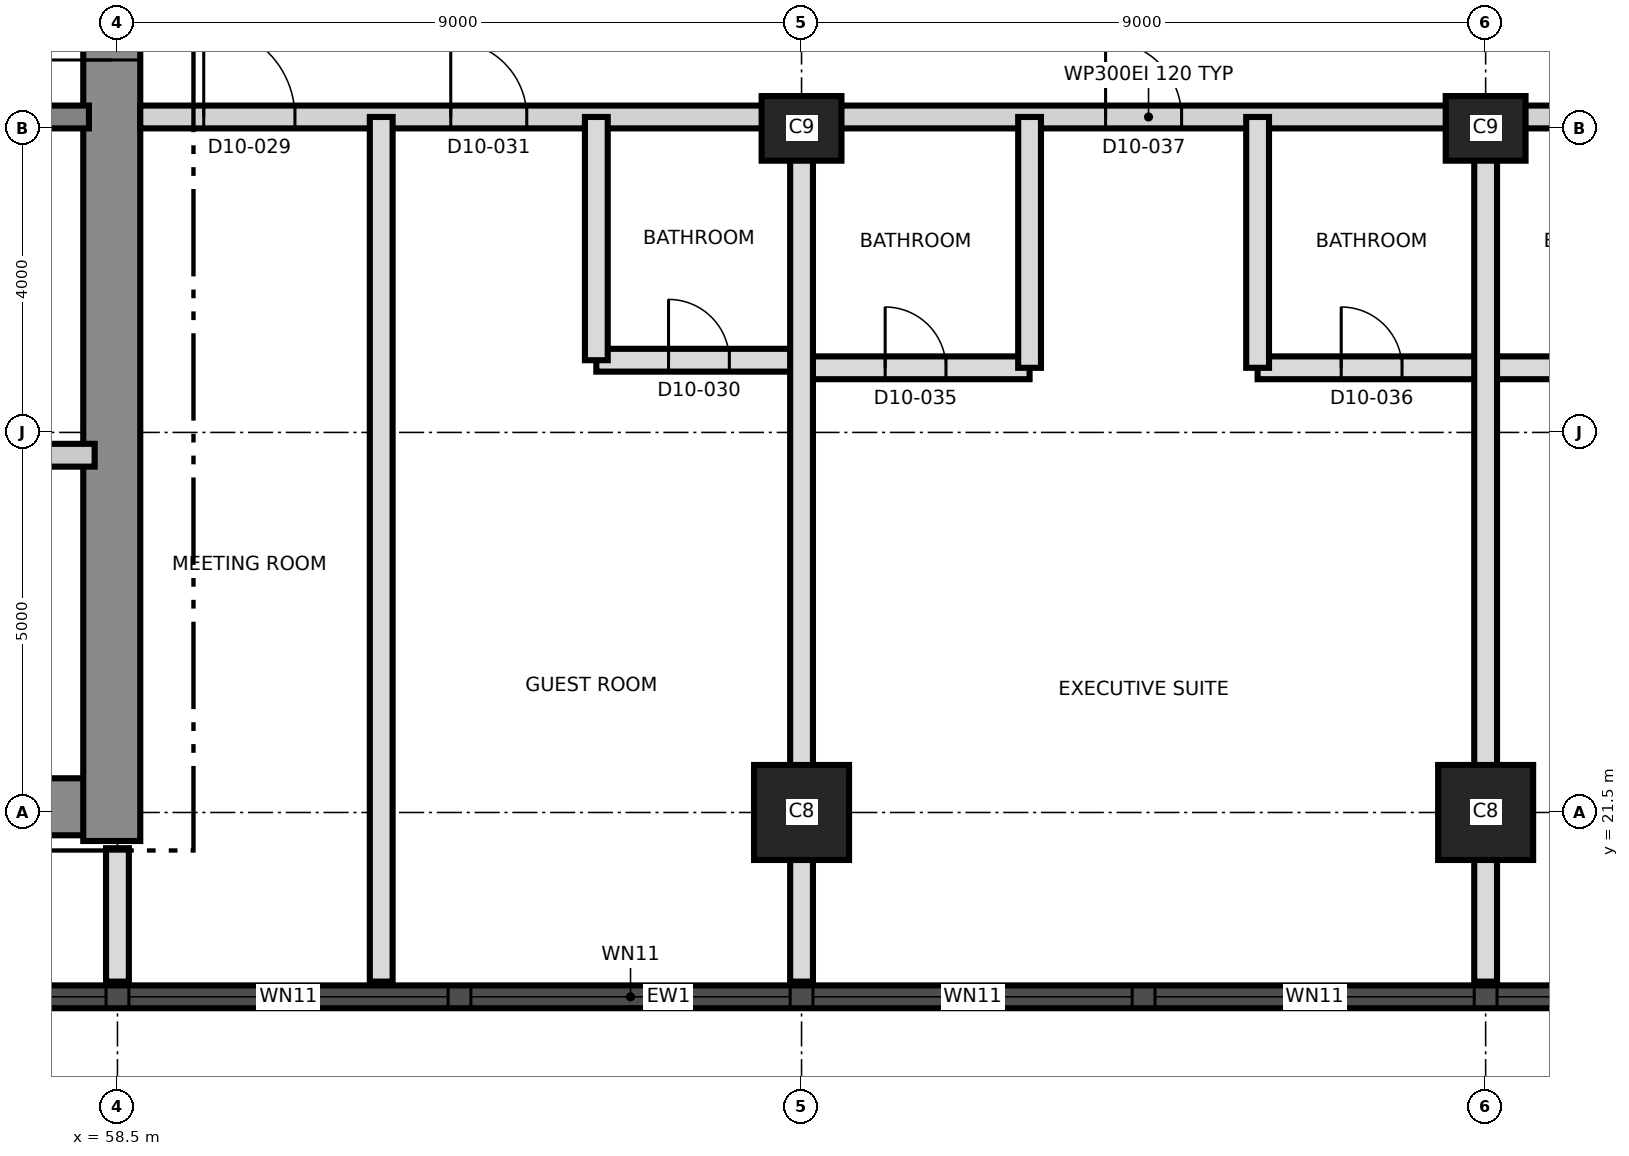
"""IFC4 building model, lengths in metres.
Left out: names, types, materials, properties, quantities, classifications, styles, units other than length and angle.
Written with IfcOpenShell. Run it as: python <this file> out.ifc"""

import sys

from ifc_helpers import new_model, si_unit, direction, frame, frame_2d, origin, origin_2d, place, context, subcontext, project, spatial, rectangle, extrude, element, fill, save


model = new_model("IFC4")
c1 = context("Model", 3, precision=1e-05, world=origin(), true_north=direction((0.0, 1.0)))
c2 = subcontext(c1, "Body", "Model", "MODEL_VIEW")
j1 = project(units=[si_unit("LENGTHUNIT", "METRE"), si_unit("PLANEANGLEUNIT", "RADIAN")], contexts=[c1])
p1 = place(None, origin())
s1 = spatial("IfcSite", under=j1, at=p1, CompositionType="ELEMENT")
p2 = place(p1, origin())
s2 = spatial("IfcBuilding", under=s1, at=p2, CompositionType="ELEMENT")
p3 = place(p2, frame((0.0, 0.0, 116.7)))
s3 = spatial("IfcBuildingStorey", under=s2, at=p3, CompositionType="ELEMENT", Elevation=116.7)
p4 = place(p3, frame((31.125, 21.575, 0.0), z_axis=(0.0, 0.0, 1.0), x_axis=(1.0, 0.0, 0.0)))
e1 = element("IfcWall", 1, at=p4, inside=s3, PredefinedType="SHEAR", context=c2, shape_type="SweptSolid", body=[
    extrude(rectangle(XDim=27.0, YDim=0.75, at=frame_2d((13.5, 0.0))), origin(), (0.0, 0.0, 1.0), 3.7),
])
p5 = place(p3, frame((58.425, 21.125, 0.0), z_axis=(0.0, 0.0, 1.0), x_axis=(0.0, 1.0, 0.0)))
e2 = element("IfcWall", 2, at=p5, inside=s3, PredefinedType="SHEAR", context=c2, shape_type="SweptSolid", body=[
    extrude(rectangle(XDim=18.75, YDim=0.75, at=frame_2d((9.375, 0.0))), origin(), (0.0, 0.0, 1.0), 3.7),
])
p6 = place(p5, frame((10.275, 0.0, 0.0)))
e3 = element("IfcOpeningElement", 3, at=p6, cuts=e2, PredefinedType="OPENING", context=c2, shape_type="SweptSolid", body=[
    extrude(rectangle(XDim=1.2, YDim=2.1, at=frame_2d((0.6, 1.05))), frame((0.0, 0.385, 0.0), z_axis=(0.0, -1.0, 0.0), x_axis=(1.0, 0.0, 0.0)), (0.0, 0.0, 1.0), 0.77),
])
p7 = place(p3, frame((31.875, 30.65, 0.0), z_axis=(0.0, 0.0, 1.0), x_axis=(1.0, 0.0, 0.0)))
e4 = element("IfcWall", 4, at=p7, inside=s3, PredefinedType="SHEAR", context=c2, shape_type="SweptSolid", body=[
    extrude(rectangle(XDim=26.25, YDim=0.3, at=frame_2d((13.125, 0.0))), origin(), (0.0, 0.0, 1.0), 3.7),
])
p8 = place(p7, frame((24.625, 0.0, 0.0)))
e5 = element("IfcOpeningElement", 5, at=p8, cuts=e4, PredefinedType="OPENING", context=c2, shape_type="SweptSolid", body=[
    extrude(rectangle(XDim=1.0, YDim=2.1, at=frame_2d((0.5, 1.05))), frame((0.0, 0.16, 0.0), z_axis=(0.0, -1.0, 0.0), x_axis=(1.0, 0.0, 0.0)), (0.0, 0.0, 1.0), 0.32),
])
p9 = place(p7, frame((11.425, 0.0, 0.0)))
e6 = element("IfcOpeningElement", 6, at=p9, cuts=e4, PredefinedType="OPENING", context=c2, shape_type="SweptSolid", body=[
    extrude(rectangle(XDim=1.0, YDim=2.1, at=frame_2d((0.5, 1.05))), frame((0.0, 0.16, 0.0), z_axis=(0.0, -1.0, 0.0), x_axis=(1.0, 0.0, 0.0)), (0.0, 0.0, 1.0), 0.32),
])
for number, where, z_axis, x_axis in (
    (7, (67.5, 21.5, 0.0), (0.0, 0.0, 1.0), (1.0, 0.0, 0.0)),
    (8, (76.5, 21.5, 0.0), (0.0, 0.0, 1.0), (1.0, 0.0, 0.0)),
):
    element("IfcColumn", number, at=place(p3, frame(where, z_axis=z_axis, x_axis=x_axis)), inside=s3, PredefinedType="COLUMN", context=c2, shape_type="SweptSolid", body=[
        extrude(rectangle(XDim=1.25, YDim=1.25, at=origin_2d()), origin(), (0.0, 0.0, 1.0), 3.7),
    ])
for number, where, z_axis, x_axis in (
    (9, (67.5, 30.5, 0.0), (0.0, 0.0, 1.0), (1.0, 0.0, 0.0)),
    (10, (76.5, 30.5, 0.0), (0.0, 0.0, 1.0), (1.0, 0.0, 0.0)),
):
    element("IfcColumn", number, at=place(p3, frame(where, z_axis=z_axis, x_axis=x_axis)), inside=s3, PredefinedType="COLUMN", context=c2, shape_type="SweptSolid", body=[
        extrude(rectangle(XDim=1.05, YDim=0.85, at=origin_2d()), origin(), (0.0, 0.0, 1.0), 3.7),
    ])
p10 = place(p3, frame((44.01, 19.075, 0.0), z_axis=(0.0, 0.0, 1.0), x_axis=(1.0, 0.0, 0.0)))
e11 = element("IfcWall", 11, at=p10, inside=s3, PredefinedType="SOLIDWALL", context=c2, shape_type="SweptSolid", body=[
    extrude(rectangle(XDim=43.478, YDim=0.3, at=frame_2d((21.739, 0.0))), origin(), (0.0, 0.0, 1.0), 3.4),
])
p11 = place(p10, frame((1.845, 0.0, 0.3)))
e12 = element("IfcOpeningElement", 12, at=p11, cuts=e11, PredefinedType="OPENING", context=c2, shape_type="SweptSolid", body=[
    extrude(rectangle(XDim=1.8, YDim=2.4, at=frame_2d((0.9, 1.2))), frame((0.0, 0.16, 0.0), z_axis=(0.0, -1.0, 0.0), x_axis=(1.0, 0.0, 0.0)), (0.0, 0.0, 1.0), 0.32),
])
p12 = place(p10, frame((5.64, 0.0, 0.9)))
e13 = element("IfcOpeningElement", 13, at=p12, cuts=e11, PredefinedType="OPENING", context=c2, shape_type="SweptSolid", body=[
    extrude(rectangle(XDim=4.2, YDim=1.5, at=frame_2d((2.1, 0.75))), frame((0.0, 0.16, 0.0), z_axis=(0.0, -1.0, 0.0), x_axis=(1.0, 0.0, 0.0)), (0.0, 0.0, 1.0), 0.32),
])
p13 = place(p10, frame((10.14, 0.0, 0.9)))
e14 = element("IfcOpeningElement", 14, at=p13, cuts=e11, PredefinedType="OPENING", context=c2, shape_type="SweptSolid", body=[
    extrude(rectangle(XDim=4.2, YDim=1.5, at=frame_2d((2.1, 0.75))), frame((0.0, 0.16, 0.0), z_axis=(0.0, -1.0, 0.0), x_axis=(1.0, 0.0, 0.0)), (0.0, 0.0, 1.0), 0.32),
])
p14 = place(p10, frame((14.64, 0.0, 0.9)))
e15 = element("IfcOpeningElement", 15, at=p14, cuts=e11, PredefinedType="OPENING", context=c2, shape_type="SweptSolid", body=[
    extrude(rectangle(XDim=4.2, YDim=1.5, at=frame_2d((2.1, 0.75))), frame((0.0, 0.16, 0.0), z_axis=(0.0, -1.0, 0.0), x_axis=(1.0, 0.0, 0.0)), (0.0, 0.0, 1.0), 0.32),
])
p15 = place(p10, frame((19.14, 0.0, 0.9)))
e16 = element("IfcOpeningElement", 16, at=p15, cuts=e11, PredefinedType="OPENING", context=c2, shape_type="SweptSolid", body=[
    extrude(rectangle(XDim=4.2, YDim=1.5, at=frame_2d((2.1, 0.75))), frame((0.0, 0.16, 0.0), z_axis=(0.0, -1.0, 0.0), x_axis=(1.0, 0.0, 0.0)), (0.0, 0.0, 1.0), 0.32),
])
p16 = place(p10, frame((23.64, 0.0, 0.9)))
e17 = element("IfcOpeningElement", 17, at=p16, cuts=e11, PredefinedType="OPENING", context=c2, shape_type="SweptSolid", body=[
    extrude(rectangle(XDim=4.2, YDim=1.5, at=frame_2d((2.1, 0.75))), frame((0.0, 0.16, 0.0), z_axis=(0.0, -1.0, 0.0), x_axis=(1.0, 0.0, 0.0)), (0.0, 0.0, 1.0), 0.32),
])
p17 = place(p10, frame((28.14, 0.0, 0.9)))
e18 = element("IfcOpeningElement", 18, at=p17, cuts=e11, PredefinedType="OPENING", context=c2, shape_type="SweptSolid", body=[
    extrude(rectangle(XDim=4.2, YDim=1.5, at=frame_2d((2.1, 0.75))), frame((0.0, 0.16, 0.0), z_axis=(0.0, -1.0, 0.0), x_axis=(1.0, 0.0, 0.0)), (0.0, 0.0, 1.0), 0.32),
])
p18 = place(p10, frame((32.64, 0.0, 0.9)))
e19 = element("IfcOpeningElement", 19, at=p18, cuts=e11, PredefinedType="OPENING", context=c2, shape_type="SweptSolid", body=[
    extrude(rectangle(XDim=4.2, YDim=1.5, at=frame_2d((2.1, 0.75))), frame((0.0, 0.16, 0.0), z_axis=(0.0, -1.0, 0.0), x_axis=(1.0, 0.0, 0.0)), (0.0, 0.0, 1.0), 0.32),
])
p19 = place(p10, frame((37.14, 0.0, 0.9)))
e20 = element("IfcOpeningElement", 20, at=p19, cuts=e11, PredefinedType="OPENING", context=c2, shape_type="SweptSolid", body=[
    extrude(rectangle(XDim=4.2, YDim=1.5, at=frame_2d((2.1, 0.75))), frame((0.0, 0.16, 0.0), z_axis=(0.0, -1.0, 0.0), x_axis=(1.0, 0.0, 0.0)), (0.0, 0.0, 1.0), 0.32),
])
p20 = place(p3, frame((55.8, 26.2, 0.0), z_axis=(0.0, 0.0, 1.0), x_axis=(1.0, 0.0, 0.0)))
e21 = element("IfcWall", 21, at=p20, inside=s3, PredefinedType="PARTITIONING", context=c2, shape_type="SweptSolid", body=[
    extrude(rectangle(XDim=2.4, YDim=0.3, at=frame_2d((1.2, 0.0))), origin(), (0.0, 0.0, 1.0), 3.4),
])
p21 = place(p20, frame((0.75, 0.0, 0.0)))
e22 = element("IfcOpeningElement", 22, at=p21, cuts=e21, PredefinedType="OPENING", context=c2, shape_type="SweptSolid", body=[
    extrude(rectangle(XDim=0.9, YDim=2.1, at=frame_2d((0.45, 1.05))), frame((0.0, 0.16, 0.0), z_axis=(0.0, -1.0, 0.0), x_axis=(1.0, 0.0, 0.0)), (0.0, 0.0, 1.0), 0.32),
])
p22 = place(p3, frame((67.5, 27.35, 0.0), z_axis=(0.0, 0.0, 1.0), x_axis=(1.0, 0.0, 0.0)))
e23 = element("IfcWall", 23, at=p22, inside=s3, PredefinedType="PARTITIONING", context=c2, shape_type="SweptSolid", body=[
    extrude(rectangle(XDim=3.0, YDim=0.3, at=frame_2d((1.5, 0.0))), origin(), (0.0, 0.0, 1.0), 3.4),
])
p23 = place(p22, frame((1.1, 0.0, 0.0)))
e24 = element("IfcOpeningElement", 24, at=p23, cuts=e23, PredefinedType="OPENING", context=c2, shape_type="SweptSolid", body=[
    extrude(rectangle(XDim=0.8, YDim=2.1, at=frame_2d((0.4, 1.05))), frame((0.0, 0.16, 0.0), z_axis=(0.0, -1.0, 0.0), x_axis=(1.0, 0.0, 0.0)), (0.0, 0.0, 1.0), 0.32),
])
p24 = place(p3, frame((73.5, 27.35, 0.0), z_axis=(0.0, 0.0, 1.0), x_axis=(1.0, 0.0, 0.0)))
e25 = element("IfcWall", 25, at=p24, inside=s3, PredefinedType="PARTITIONING", context=c2, shape_type="SweptSolid", body=[
    extrude(rectangle(XDim=6.0, YDim=0.3, at=frame_2d((3.0, 0.0))), origin(), (0.0, 0.0, 1.0), 3.4),
])
p25 = place(p24, frame((1.1, 0.0, 0.0)))
e26 = element("IfcOpeningElement", 26, at=p25, cuts=e25, PredefinedType="OPENING", context=c2, shape_type="SweptSolid", body=[
    extrude(rectangle(XDim=0.8, YDim=2.1, at=frame_2d((0.4, 1.05))), frame((0.0, 0.16, 0.0), z_axis=(0.0, -1.0, 0.0), x_axis=(1.0, 0.0, 0.0)), (0.0, 0.0, 1.0), 0.32),
])
p26 = place(p24, frame((4.1, 0.0, 0.0)))
e27 = element("IfcOpeningElement", 27, at=p26, cuts=e25, PredefinedType="OPENING", context=c2, shape_type="SweptSolid", body=[
    extrude(rectangle(XDim=0.8, YDim=2.1, at=frame_2d((0.4, 1.05))), frame((0.0, 0.16, 0.0), z_axis=(0.0, -1.0, 0.0), x_axis=(1.0, 0.0, 0.0)), (0.0, 0.0, 1.0), 0.32),
])
p27 = place(p3, frame((64.8, 27.45, 0.0), z_axis=(0.0, 0.0, 1.0), x_axis=(1.0, 0.0, 0.0)))
e28 = element("IfcWall", 28, at=p27, inside=s3, PredefinedType="PARTITIONING", context=c2, shape_type="SweptSolid", body=[
    extrude(rectangle(XDim=2.7, YDim=0.3, at=frame_2d((1.35, 0.0))), origin(), (0.0, 0.0, 1.0), 3.4),
])
p28 = place(p27, frame((0.95, 0.0, 0.0)))
e29 = element("IfcOpeningElement", 29, at=p28, cuts=e28, PredefinedType="OPENING", context=c2, shape_type="SweptSolid", body=[
    extrude(rectangle(XDim=0.8, YDim=2.1, at=frame_2d((0.4, 1.05))), frame((0.0, 0.16, 0.0), z_axis=(0.0, -1.0, 0.0), x_axis=(1.0, 0.0, 0.0)), (0.0, 0.0, 1.0), 0.32),
])
p29 = place(p3, frame((58.8, 30.65, 0.0), z_axis=(0.0, 0.0, 1.0), x_axis=(1.0, 0.0, 0.0)))
e30 = element("IfcWall", 30, at=p29, inside=s3, PredefinedType="PARTITIONING", context=c2, shape_type="SweptSolid", body=[
    extrude(rectangle(XDim=26.53, YDim=0.3, at=frame_2d((13.265, 0.0))), origin(), (0.0, 0.0, 1.0), 3.4),
])
p30 = place(p29, frame((0.835, 0.0, 0.0)))
e31 = element("IfcOpeningElement", 31, at=p30, cuts=e30, PredefinedType="OPENING", context=c2, shape_type="SweptSolid", body=[
    extrude(rectangle(XDim=1.2, YDim=2.1, at=frame_2d((0.6, 1.05))), frame((0.0, 0.16, 0.0), z_axis=(0.0, -1.0, 0.0), x_axis=(1.0, 0.0, 0.0)), (0.0, 0.0, 1.0), 0.32),
])
p31 = place(p29, frame((4.085, 0.0, 0.0)))
e32 = element("IfcOpeningElement", 32, at=p31, cuts=e30, PredefinedType="OPENING", context=c2, shape_type="SweptSolid", body=[
    extrude(rectangle(XDim=1.0, YDim=2.1, at=frame_2d((0.5, 1.05))), frame((0.0, 0.16, 0.0), z_axis=(0.0, -1.0, 0.0), x_axis=(1.0, 0.0, 0.0)), (0.0, 0.0, 1.0), 0.32),
])
p32 = place(p29, frame((12.7, 0.0, 0.0)))
e33 = element("IfcOpeningElement", 33, at=p32, cuts=e30, PredefinedType="OPENING", context=c2, shape_type="SweptSolid", body=[
    extrude(rectangle(XDim=1.0, YDim=2.4, at=frame_2d((0.5, 1.2))), frame((0.0, 0.16, 0.0), z_axis=(0.0, -1.0, 0.0), x_axis=(1.0, 0.0, 0.0)), (0.0, 0.0, 1.0), 0.32),
])
p33 = place(p29, frame((21.7, 0.0, 0.0)))
e34 = element("IfcOpeningElement", 34, at=p33, cuts=e30, PredefinedType="OPENING", context=c2, shape_type="SweptSolid", body=[
    extrude(rectangle(XDim=1.0, YDim=2.4, at=frame_2d((0.5, 1.2))), frame((0.0, 0.16, 0.0), z_axis=(0.0, -1.0, 0.0), x_axis=(1.0, 0.0, 0.0)), (0.0, 0.0, 1.0), 0.32),
])
p34 = place(p3, frame((58.5, 19.275, 0.0), z_axis=(0.0, 0.0, 1.0), x_axis=(0.0, 1.0, 0.0)))
e35 = element("IfcWall", 35, at=p34, inside=s3, PredefinedType="PARTITIONING", context=c2, shape_type="SweptSolid", body=[
    extrude(rectangle(XDim=1.755, YDim=0.3, at=frame_2d((0.877, 0.0))), origin(), (0.0, 0.0, 1.0), 3.4),
])
p35 = place(p3, frame((61.97, 19.275, 0.0), z_axis=(0.0, 0.0, 1.0), x_axis=(0.0, 1.0, 0.0)))
e36 = element("IfcWall", 36, at=p35, inside=s3, PredefinedType="PARTITIONING", context=c2, shape_type="SweptSolid", body=[
    extrude(rectangle(XDim=11.375, YDim=0.3, at=frame_2d((5.688, 0.0))), origin(), (0.0, 0.0, 1.0), 3.4),
])
p36 = place(p3, frame((64.8, 27.45, 0.0), z_axis=(0.0, 0.0, 1.0), x_axis=(0.0, 1.0, 0.0)))
e37 = element("IfcWall", 37, at=p36, inside=s3, PredefinedType="PARTITIONING", context=c2, shape_type="SweptSolid", body=[
    extrude(rectangle(XDim=3.2, YDim=0.3, at=frame_2d((1.6, 0.0))), origin(), (0.0, 0.0, 1.0), 3.4),
])
p37 = place(p3, frame((67.5, 19.275, 0.0), z_axis=(0.0, 0.0, 1.0), x_axis=(0.0, 1.0, 0.0)))
e38 = element("IfcWall", 38, at=p37, inside=s3, PredefinedType="PARTITIONING", context=c2, shape_type="SweptSolid", body=[
    extrude(rectangle(XDim=11.375, YDim=0.3, at=frame_2d((5.688, 0.0))), origin(), (0.0, 0.0, 1.0), 3.4),
])
for number, where, z_axis, x_axis in (
    (39, (70.5, 27.35, 0.0), (0.0, 0.0, 1.0), (0.0, 1.0, 0.0)),
    (40, (73.5, 27.35, 0.0), (0.0, 0.0, 1.0), (0.0, 1.0, 0.0)),
):
    element("IfcWall", number, at=place(p3, frame(where, z_axis=z_axis, x_axis=x_axis)), inside=s3, PredefinedType="PARTITIONING", context=c2, shape_type="SweptSolid", body=[
        extrude(rectangle(XDim=3.3, YDim=0.3, at=frame_2d((1.65, 0.0))), origin(), (0.0, 0.0, 1.0), 3.4),
    ])
p38 = place(p3, frame((76.5, 19.275, 0.0), z_axis=(0.0, 0.0, 1.0), x_axis=(0.0, 1.0, 0.0)))
e41 = element("IfcWall", 41, at=p38, inside=s3, PredefinedType="PARTITIONING", context=c2, shape_type="SweptSolid", body=[
    extrude(rectangle(XDim=11.375, YDim=0.3, at=frame_2d((5.688, 0.0))), origin(), (0.0, 0.0, 1.0), 3.4),
])
p39 = place(p13, origin())
e42 = element("IfcWindow", 42, at=p39, inside=s3, PartitioningType="SINGLE_PANEL", PredefinedType="WINDOW", context=c2, shape_type="SweptSolid", body=[
    extrude(rectangle(XDim=4.2, YDim=1.5, at=frame_2d((2.1, 0.75))), frame((0.0, 0.03, 0.0), z_axis=(0.0, -1.0, 0.0), x_axis=(1.0, 0.0, 0.0)), (0.0, 0.0, 1.0), 0.06),
])
fill(e14, e42)
p40 = place(p14, origin())
e43 = element("IfcWindow", 43, at=p40, inside=s3, PartitioningType="SINGLE_PANEL", PredefinedType="WINDOW", context=c2, shape_type="SweptSolid", body=[
    extrude(rectangle(XDim=4.2, YDim=1.5, at=frame_2d((2.1, 0.75))), frame((0.0, 0.03, 0.0), z_axis=(0.0, -1.0, 0.0), x_axis=(1.0, 0.0, 0.0)), (0.0, 0.0, 1.0), 0.06),
])
fill(e15, e43)
p41 = place(p15, origin())
e44 = element("IfcWindow", 44, at=p41, inside=s3, PartitioningType="SINGLE_PANEL", PredefinedType="WINDOW", context=c2, shape_type="SweptSolid", body=[
    extrude(rectangle(XDim=4.2, YDim=1.5, at=frame_2d((2.1, 0.75))), frame((0.0, 0.03, 0.0), z_axis=(0.0, -1.0, 0.0), x_axis=(1.0, 0.0, 0.0)), (0.0, 0.0, 1.0), 0.06),
])
fill(e16, e44)
p42 = place(p16, origin())
e45 = element("IfcWindow", 45, at=p42, inside=s3, PartitioningType="SINGLE_PANEL", PredefinedType="WINDOW", context=c2, shape_type="SweptSolid", body=[
    extrude(rectangle(XDim=4.2, YDim=1.5, at=frame_2d((2.1, 0.75))), frame((0.0, 0.03, 0.0), z_axis=(0.0, -1.0, 0.0), x_axis=(1.0, 0.0, 0.0)), (0.0, 0.0, 1.0), 0.06),
])
fill(e17, e45)
p43 = place(p17, origin())
e46 = element("IfcWindow", 46, at=p43, inside=s3, PartitioningType="SINGLE_PANEL", PredefinedType="WINDOW", context=c2, shape_type="SweptSolid", body=[
    extrude(rectangle(XDim=4.2, YDim=1.5, at=frame_2d((2.1, 0.75))), frame((0.0, 0.03, 0.0), z_axis=(0.0, -1.0, 0.0), x_axis=(1.0, 0.0, 0.0)), (0.0, 0.0, 1.0), 0.06),
])
fill(e18, e46)
p44 = place(p18, origin())
e47 = element("IfcWindow", 47, at=p44, inside=s3, PartitioningType="SINGLE_PANEL", PredefinedType="WINDOW", context=c2, shape_type="SweptSolid", body=[
    extrude(rectangle(XDim=4.2, YDim=1.5, at=frame_2d((2.1, 0.75))), frame((0.0, 0.03, 0.0), z_axis=(0.0, -1.0, 0.0), x_axis=(1.0, 0.0, 0.0)), (0.0, 0.0, 1.0), 0.06),
])
fill(e19, e47)
p45 = place(p6, origin())
e48 = element("IfcDoor", 48, at=p45, inside=s3, OperationType="SINGLE_SWING_LEFT", PredefinedType="DOOR", context=c2, shape_type="SweptSolid", body=[
    extrude(rectangle(XDim=1.2, YDim=2.1, at=frame_2d((0.6, 1.05))), frame((0.0, 0.025, 0.0), z_axis=(0.0, -1.0, 0.0), x_axis=(1.0, 0.0, 0.0)), (0.0, 0.0, 1.0), 0.05),
])
fill(e3, e48)
p46 = place(p30, origin())
e49 = element("IfcDoor", 49, at=p46, inside=s3, OperationType="SINGLE_SWING_LEFT", PredefinedType="DOOR", context=c2, shape_type="SweptSolid", body=[
    extrude(rectangle(XDim=1.2, YDim=2.1, at=frame_2d((0.6, 1.05))), frame((0.0, 0.025, 0.0), z_axis=(0.0, -1.0, 0.0), x_axis=(1.0, 0.0, 0.0)), (0.0, 0.0, 1.0), 0.05),
])
fill(e31, e49)
p47 = place(p28, origin())
e50 = element("IfcDoor", 50, at=p47, inside=s3, OperationType="SINGLE_SWING_RIGHT", PredefinedType="DOOR", context=c2, shape_type="SweptSolid", body=[
    extrude(rectangle(XDim=0.8, YDim=2.1, at=frame_2d((0.4, 1.05))), frame((0.0, 0.025, 0.0), z_axis=(0.0, -1.0, 0.0), x_axis=(1.0, 0.0, 0.0)), (0.0, 0.0, 1.0), 0.05),
])
fill(e29, e50)
p48 = place(p31, origin())
e51 = element("IfcDoor", 51, at=p48, inside=s3, OperationType="SINGLE_SWING_LEFT", PredefinedType="DOOR", context=c2, shape_type="SweptSolid", body=[
    extrude(rectangle(XDim=1.0, YDim=2.1, at=frame_2d((0.5, 1.05))), frame((0.0, 0.025, 0.0), z_axis=(0.0, -1.0, 0.0), x_axis=(1.0, 0.0, 0.0)), (0.0, 0.0, 1.0), 0.05),
])
fill(e32, e51)
p49 = place(p23, origin())
e52 = element("IfcDoor", 52, at=p49, inside=s3, OperationType="SINGLE_SWING_LEFT", PredefinedType="DOOR", context=c2, shape_type="SweptSolid", body=[
    extrude(rectangle(XDim=0.8, YDim=2.1, at=frame_2d((0.4, 1.05))), frame((0.0, 0.025, 0.0), z_axis=(0.0, -1.0, 0.0), x_axis=(1.0, 0.0, 0.0)), (0.0, 0.0, 1.0), 0.05),
])
fill(e24, e52)
p50 = place(p25, origin())
e53 = element("IfcDoor", 53, at=p50, inside=s3, OperationType="SINGLE_SWING_RIGHT", PredefinedType="DOOR", context=c2, shape_type="SweptSolid", body=[
    extrude(rectangle(XDim=0.8, YDim=2.1, at=frame_2d((0.4, 1.05))), frame((0.0, 0.025, 0.0), z_axis=(0.0, -1.0, 0.0), x_axis=(1.0, 0.0, 0.0)), (0.0, 0.0, 1.0), 0.05),
])
fill(e26, e53)
p51 = place(p32, origin())
e54 = element("IfcDoor", 54, at=p51, inside=s3, OperationType="SINGLE_SWING_LEFT", PredefinedType="DOOR", context=c2, shape_type="SweptSolid", body=[
    extrude(rectangle(XDim=1.0, YDim=2.4, at=frame_2d((0.5, 1.2))), frame((0.0, 0.025, 0.0), z_axis=(0.0, -1.0, 0.0), x_axis=(1.0, 0.0, 0.0)), (0.0, 0.0, 1.0), 0.05),
])
fill(e33, e54)
save(model, sys.argv[1])
